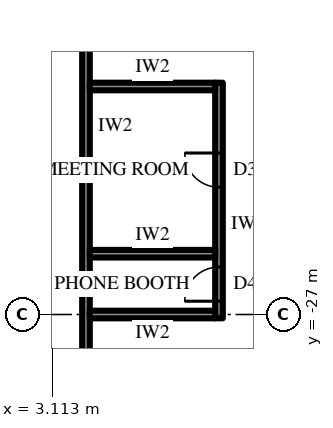
"""IFC4 building model, lengths in metres.
Left out: names, types, materials, properties, quantities, classifications, styles, units other than length and angle.
Written with IfcOpenShell. Run it as: python <this file> out.ifc"""

import sys

from ifc_helpers import new_model, si_unit, direction, frame, frame_2d, origin, place, context, subcontext, project, spatial, rectangle, extrude, element, fill, save


model = new_model("IFC4")
c1 = context("Model", 3, precision=1e-05, world=origin(), true_north=direction((0.0, 1.0)))
c2 = subcontext(c1, "Body", "Model", "MODEL_VIEW")
j1 = project(units=[si_unit("LENGTHUNIT", "METRE"), si_unit("PLANEANGLEUNIT", "RADIAN")], contexts=[c1])
p1 = place(None, origin())
s1 = spatial("IfcSite", under=j1, at=p1, CompositionType="ELEMENT")
p2 = place(p1, origin())
s2 = spatial("IfcBuilding", under=s1, at=p2, CompositionType="ELEMENT")
p3 = place(p2, frame((0.0, 0.0, 48.7)))
s3 = spatial("IfcBuildingStorey", under=s2, at=p3, CompositionType="ELEMENT", Elevation=48.7)
p4 = place(p3, frame((4.0, -14.2, 0.0), z_axis=(0.0, 0.0, 1.0), x_axis=(0.0, -1.0, 0.0)))
e1 = element("IfcWall", 1, at=p4, inside=s3, PredefinedType="PARTITIONING", context=c2, shape_type="SweptSolid", body=[
    extrude(rectangle(XDim=19.6, YDim=0.2, at=frame_2d((9.8, 0.0))), origin(), (0.0, 0.0, 1.0), 4.0),
])
p5 = place(p4, frame((1.46, 0.0, 0.0)))
e2 = element("IfcOpeningElement", 2, at=p5, cuts=e1, PredefinedType="OPENING", context=c2, shape_type="SweptSolid", body=[
    extrude(rectangle(XDim=1.0, YDim=2.2, at=frame_2d((0.5, 1.1))), frame((0.0, 0.11, 0.0), z_axis=(0.0, -1.0, 0.0), x_axis=(1.0, 0.0, 0.0)), (0.0, 0.0, 1.0), 0.22),
])
p6 = place(p3, frame((7.5, -20.9, 0.0), z_axis=(0.0, 0.0, 1.0), x_axis=(0.0, -1.0, 0.0)))
e3 = element("IfcWall", 3, at=p6, inside=s3, PredefinedType="PARTITIONING", context=c2, shape_type="SweptSolid", body=[
    extrude(rectangle(XDim=6.2, YDim=0.2, at=frame_2d((3.1, 0.0))), origin(), (0.0, 0.0, 1.0), 4.0),
])
p7 = place(p6, frame((1.85, 0.0, 0.0)))
e4 = element("IfcOpeningElement", 4, at=p7, cuts=e3, PredefinedType="OPENING", context=c2, shape_type="SweptSolid", body=[
    extrude(rectangle(XDim=0.9, YDim=2.2, at=frame_2d((0.45, 1.1))), frame((0.0, 0.11, 0.0), z_axis=(0.0, -1.0, 0.0), x_axis=(1.0, 0.0, 0.0)), (0.0, 0.0, 1.0), 0.22),
])
p8 = place(p6, frame((4.85, 0.0, 0.0)))
e5 = element("IfcOpeningElement", 5, at=p8, cuts=e3, PredefinedType="OPENING", context=c2, shape_type="SweptSolid", body=[
    extrude(rectangle(XDim=0.9, YDim=2.2, at=frame_2d((0.45, 1.1))), frame((0.0, 0.11, 0.0), z_axis=(0.0, -1.0, 0.0), x_axis=(1.0, 0.0, 0.0)), (0.0, 0.0, 1.0), 0.22),
])
for number, where, z_axis, x_axis in (
    (6, (4.1, -21.0, 0.0), (0.0, 0.0, 1.0), (1.0, 0.0, 0.0)),
    (7, (4.1, -25.4, 0.0), (0.0, 0.0, 1.0), (1.0, 0.0, 0.0)),
    (8, (4.1, -27.0, 0.0), (0.0, 0.0, 1.0), (1.0, 0.0, 0.0)),
):
    element("IfcWall", number, at=place(p3, frame(where, z_axis=z_axis, x_axis=x_axis)), inside=s3, PredefinedType="PARTITIONING", context=c2, shape_type="SweptSolid", body=[
        extrude(rectangle(XDim=3.3, YDim=0.2, at=frame_2d((1.65, 0.0))), origin(), (0.0, 0.0, 1.0), 4.0),
    ])
p9 = place(p7, frame((0.9, 0.0, 0.0), z_axis=(0.0, 0.0, 1.0), x_axis=(-1.0, 0.0, 0.0)))
e9 = element("IfcDoor", 9, at=p9, inside=s3, OperationType="SINGLE_SWING_LEFT", PredefinedType="DOOR", context=c2, shape_type="SweptSolid", body=[
    extrude(rectangle(XDim=0.9, YDim=2.2, at=frame_2d((0.45, 1.1))), frame((0.0, 0.025, 0.0), z_axis=(0.0, -1.0, 0.0), x_axis=(1.0, 0.0, 0.0)), (0.0, 0.0, 1.0), 0.05),
])
fill(e4, e9)
p10 = place(p8, frame((0.9, 0.0, 0.0), z_axis=(0.0, 0.0, 1.0), x_axis=(-1.0, 0.0, 0.0)))
e10 = element("IfcDoor", 10, at=p10, inside=s3, OperationType="SINGLE_SWING_RIGHT", PredefinedType="DOOR", context=c2, shape_type="SweptSolid", body=[
    extrude(rectangle(XDim=0.9, YDim=2.2, at=frame_2d((0.45, 1.1))), frame((0.0, 0.025, 0.0), z_axis=(0.0, -1.0, 0.0), x_axis=(1.0, 0.0, 0.0)), (0.0, 0.0, 1.0), 0.05),
])
fill(e5, e10)
save(model, sys.argv[1])
